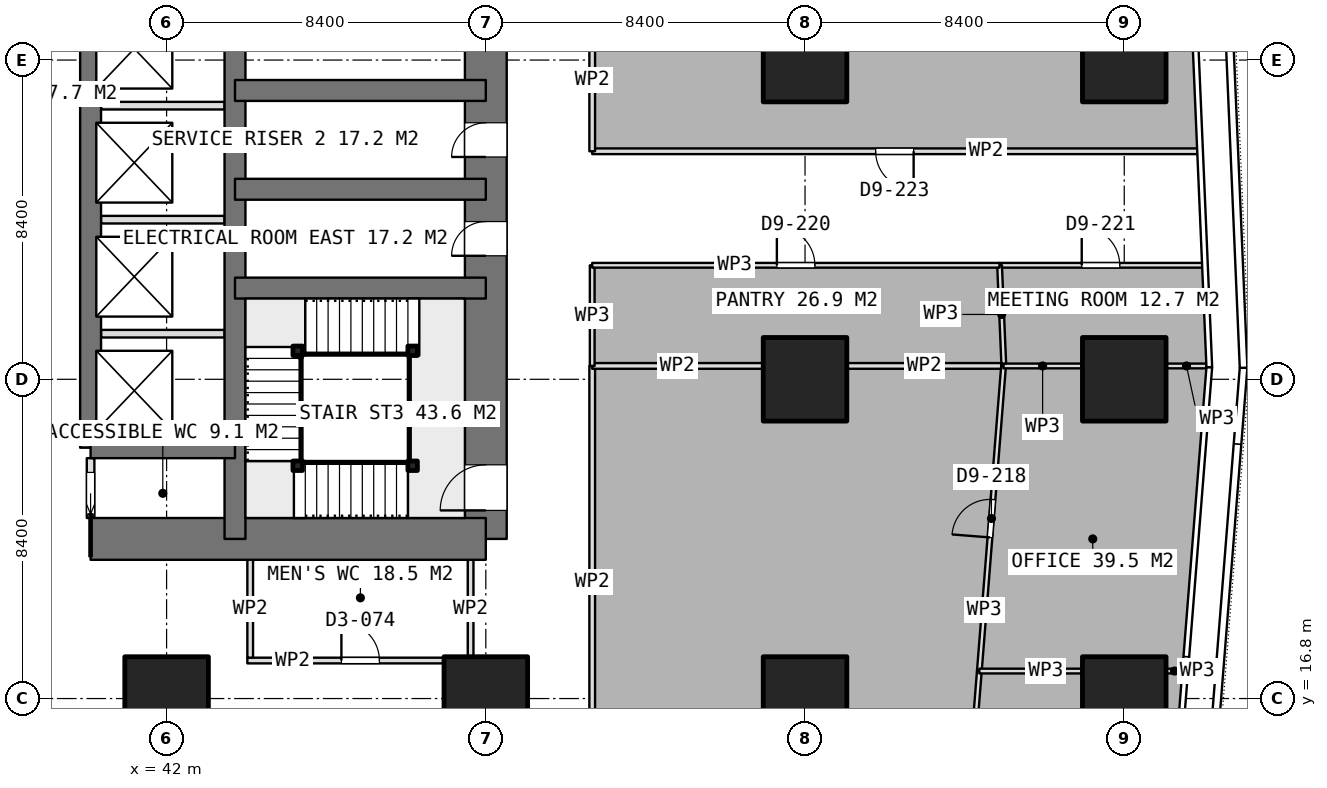
"""IFC4 building model, lengths in metres.
Left out: names, types, materials, properties, quantities, classifications, styles, units other than length and angle.
Written with IfcOpenShell. Run it as: python <this file> out.ifc"""

import sys

from ifc_helpers import new_model, si_unit, direction, frame, frame_2d, origin, origin_2d, place, context, subcontext, project, spatial, rectangle, extrude, element, fill, save


model = new_model("IFC4")
c1 = context("Model", 3, precision=1e-05, world=origin(), true_north=direction((0.0, 1.0)))
c2 = subcontext(c1, "Body", "Model", "MODEL_VIEW")
j1 = project(units=[si_unit("LENGTHUNIT", "METRE"), si_unit("PLANEANGLEUNIT", "RADIAN")], contexts=[c1])
p1 = place(None, origin())
s1 = spatial("IfcSite", under=j1, at=p1, CompositionType="ELEMENT")
p2 = place(p1, origin())
s2 = spatial("IfcBuilding", under=s1, at=p2, CompositionType="ELEMENT")
p3 = place(p2, frame((0.0, 0.0, 66.65)))
s3 = spatial("IfcBuildingStorey", under=s2, at=p3, CompositionType="ELEMENT", Elevation=66.65)
p4 = place(p3, frame((40.0, 21.0, 0.0), z_axis=(0.0, 0.0, 1.0), x_axis=(1.0, 0.0, 0.0)))
e1 = element("IfcWall", 1, at=p4, inside=s3, PredefinedType="SHEAR", context=c2, shape_type="SweptSolid", body=[
    extrude(rectangle(XDim=10.4, YDim=1.1, at=frame_2d((5.2, 0.0))), origin(), (0.0, 0.0, 1.0), 3.75),
])
p5 = place(p3, frame((50.4, 21.0, 0.0), z_axis=(0.0, 0.0, 1.0), x_axis=(0.0, 1.0, 0.0)))
e2 = element("IfcWall", 2, at=p5, inside=s3, PredefinedType="SHEAR", context=c2, shape_type="SweptSolid", body=[
    extrude(rectangle(XDim=25.2, YDim=1.1, at=frame_2d((12.6, 0.0))), origin(), (0.0, 0.0, 1.0), 3.75),
])
p6 = place(p5, frame((16.2, 0.0, 0.0)))
e3 = element("IfcOpeningElement", 3, at=p6, cuts=e2, PredefinedType="OPENING", context=c2, shape_type="SweptSolid", body=[
    extrude(rectangle(XDim=1.2, YDim=2.1, at=frame_2d((0.6, 1.05))), frame((0.0, 0.56, 0.0), z_axis=(0.0, -1.0, 0.0), x_axis=(1.0, 0.0, 0.0)), (0.0, 0.0, 1.0), 1.12),
])
p7 = place(p5, frame((10.05, 0.0, 0.0)))
e4 = element("IfcOpeningElement", 4, at=p7, cuts=e2, PredefinedType="OPENING", context=c2, shape_type="SweptSolid", body=[
    extrude(rectangle(XDim=0.9, YDim=2.1, at=frame_2d((0.45, 1.05))), frame((0.0, 0.56, 0.0), z_axis=(0.0, -1.0, 0.0), x_axis=(1.0, 0.0, 0.0)), (0.0, 0.0, 1.0), 1.12),
])
p8 = place(p5, frame((7.45, 0.0, 0.0)))
e5 = element("IfcOpeningElement", 5, at=p8, cuts=e2, PredefinedType="OPENING", context=c2, shape_type="SweptSolid", body=[
    extrude(rectangle(XDim=0.9, YDim=2.1, at=frame_2d((0.45, 1.05))), frame((0.0, 0.56, 0.0), z_axis=(0.0, -1.0, 0.0), x_axis=(1.0, 0.0, 0.0)), (0.0, 0.0, 1.0), 1.12),
])
p9 = place(p5, frame((0.75, 0.0, 0.0)))
e6 = element("IfcOpeningElement", 6, at=p9, cuts=e2, PredefinedType="OPENING", context=c2, shape_type="SweptSolid", body=[
    extrude(rectangle(XDim=1.2, YDim=2.1, at=frame_2d((0.6, 1.05))), frame((0.0, 0.56, 0.0), z_axis=(0.0, -1.0, 0.0), x_axis=(1.0, 0.0, 0.0)), (0.0, 0.0, 1.0), 1.12),
])
p10 = place(p3, frame((43.8, 21.0, 0.0), z_axis=(0.0, 0.0, 1.0), x_axis=(0.0, 1.0, 0.0)))
e7 = element("IfcWall", 7, at=p10, inside=s3, PredefinedType="SHEAR", context=c2, shape_type="SweptSolid", body=[
    extrude(rectangle(XDim=25.2, YDim=0.55, at=frame_2d((12.6, 0.0))), origin(), (0.0, 0.0, 1.0), 3.75),
])
p11 = place(p3, frame((40.0, 23.4, 0.0), z_axis=(0.0, 0.0, 1.0), x_axis=(0.0, 1.0, 0.0)))
e8 = element("IfcWall", 8, at=p11, inside=s3, PredefinedType="SHEAR", context=c2, shape_type="SweptSolid", body=[
    extrude(rectangle(XDim=18.0, YDim=0.55, at=frame_2d((9.0, 0.0))), origin(), (0.0, 0.0, 1.0), 3.75),
])
p12 = place(p3, frame((40.0, 23.4, 0.0), z_axis=(0.0, 0.0, 1.0), x_axis=(1.0, 0.0, 0.0)))
e9 = element("IfcWall", 9, at=p12, inside=s3, PredefinedType="SHEAR", context=c2, shape_type="SweptSolid", body=[
    extrude(rectangle(XDim=3.8, YDim=0.55, at=frame_2d((1.9, 0.0))), origin(), (0.0, 0.0, 1.0), 3.75),
])
for number, where, z_axis, x_axis in (
    (10, (43.8, 27.6, 0.0), (0.0, 0.0, 1.0), (1.0, 0.0, 0.0)),
    (11, (43.8, 30.2, 0.0), (0.0, 0.0, 1.0), (1.0, 0.0, 0.0)),
    (12, (43.8, 32.8, 0.0), (0.0, 0.0, 1.0), (1.0, 0.0, 0.0)),
):
    element("IfcWall", number, at=place(p3, frame(where, z_axis=z_axis, x_axis=x_axis)), inside=s3, PredefinedType="SHEAR", context=c2, shape_type="SweptSolid", body=[
        extrude(rectangle(XDim=6.6, YDim=0.55, at=frame_2d((3.3, 0.0))), origin(), (0.0, 0.0, 1.0), 3.75),
    ])
for number, where, z_axis, x_axis in (
    (13, (42.0, 16.8, 0.0), (0.0, 0.0, 1.0), (1.0, 0.0, 0.0)),
    (14, (50.4, 16.8, 0.0), (0.0, 0.0, 1.0), (1.0, 0.0, 0.0)),
    (15, (58.8, 16.8, 0.0), (0.0, 0.0, 1.0), (1.0, 0.0, 0.0)),
    (16, (58.8, 25.2, 0.0), (0.0, 0.0, 1.0), (1.0, 0.0, 0.0)),
    (17, (58.8, 33.6, 0.0), (0.0, 0.0, 1.0), (1.0, 0.0, 0.0)),
    (18, (67.2, 16.8, 0.0), (0.0, 0.0, 1.0), (1.0, 0.0, 0.0)),
    (19, (67.2, 25.2, 0.0), (0.0, 0.0, 1.0), (1.0, 0.0, 0.0)),
    (20, (67.2, 33.6, 0.0), (0.0, 0.0, 1.0), (1.0, 0.0, 0.0)),
):
    element("IfcColumn", number, at=place(p3, frame(where, z_axis=z_axis, x_axis=x_axis)), inside=s3, PredefinedType="COLUMN", context=c2, shape_type="SweptSolid", body=[
        extrude(rectangle(XDim=2.2, YDim=2.2, at=origin_2d()), origin(), (0.0, 0.0, 1.0), 3.75),
    ])
for number, where, z_axis, x_axis in (
    (21, (40.275, 26.4, 0.0), (0.0, 0.0, 1.0), (1.0, 0.0, 0.0)),
    (22, (40.275, 29.4, 0.0), (0.0, 0.0, 1.0), (1.0, 0.0, 0.0)),
    (23, (40.275, 32.4, 0.0), (0.0, 0.0, 1.0), (1.0, 0.0, 0.0)),
):
    element("IfcWall", number, at=place(p3, frame(where, z_axis=z_axis, x_axis=x_axis)), inside=s3, PredefinedType="PARTITIONING", context=c2, shape_type="SweptSolid", body=[
        extrude(rectangle(XDim=3.25, YDim=0.2, at=frame_2d((1.625, 0.0))), origin(), (0.0, 0.0, 1.0), 3.5),
    ])
p13 = place(p3, frame((40.0, 21.55, 0.0), z_axis=(0.0, 0.0, 1.0), x_axis=(0.0, 1.0, 0.0)))
e24 = element("IfcWall", 24, at=p13, inside=s3, PredefinedType="PARTITIONING", context=c2, shape_type="SweptSolid", body=[
    extrude(rectangle(XDim=1.575, YDim=0.2, at=frame_2d((0.788, 0.0))), origin(), (0.0, 0.0, 1.0), 3.5),
])
p14 = place(p13, frame((0.1, 0.0, 0.0)))
e25 = element("IfcOpeningElement", 25, at=p14, cuts=e24, PredefinedType="OPENING", context=c2, shape_type="SweptSolid", body=[
    extrude(rectangle(XDim=1.1, YDim=2.1, at=frame_2d((0.55, 1.05))), frame((0.0, 0.11, 0.0), z_axis=(0.0, -1.0, 0.0), x_axis=(1.0, 0.0, 0.0)), (0.0, 0.0, 1.0), 0.22),
])
p15 = place(p3, frame((44.125, 17.8, 0.0), z_axis=(0.0, 0.0, 1.0), x_axis=(1.0, 0.0, 0.0)))
e26 = element("IfcWall", 26, at=p15, inside=s3, PredefinedType="PARTITIONING", context=c2, shape_type="SweptSolid", body=[
    extrude(rectangle(XDim=5.95, YDim=0.15, at=frame_2d((2.975, 0.0))), origin(), (0.0, 0.0, 1.0), 3.5),
])
p16 = place(p15, frame((2.475, 0.0, 0.0)))
e27 = element("IfcOpeningElement", 27, at=p16, cuts=e26, PredefinedType="OPENING", context=c2, shape_type="SweptSolid", body=[
    extrude(rectangle(XDim=1.0, YDim=2.1, at=frame_2d((0.5, 1.05))), frame((0.0, 0.085, 0.0), z_axis=(0.0, -1.0, 0.0), x_axis=(1.0, 0.0, 0.0)), (0.0, 0.0, 1.0), 0.17),
])
for number, where, z_axis, x_axis in (
    (28, (44.2, 17.875, 0.0), (0.0, 0.0, 1.0), (0.0, 1.0, 0.0)),
    (29, (50.0, 17.875, 0.0), (0.0, 0.0, 1.0), (0.0, 1.0, 0.0)),
):
    element("IfcWall", number, at=place(p3, frame(where, z_axis=z_axis, x_axis=x_axis)), inside=s3, PredefinedType="PARTITIONING", context=c2, shape_type="SweptSolid", body=[
        extrude(rectangle(XDim=2.575, YDim=0.15, at=frame_2d((1.288, 0.0))), origin(), (0.0, 0.0, 1.0), 3.5),
    ])
p17 = place(p3, frame((62.996, 12.599, 0.0), z_axis=(0.0, 0.0, 1.0), x_axis=(0.079134233178, 0.996863969225, 0.0)))
e30 = element("IfcWall", 30, at=p17, inside=s3, PredefinedType="PARTITIONING", context=c2, shape_type="SweptSolid", body=[
    extrude(rectangle(XDim=4.939, YDim=0.125, at=frame_2d((2.47, 0.0))), origin(), (0.0, 0.0, 1.0), 3.5),
])
p18 = place(p3, frame((63.387, 17.523, 0.0), z_axis=(0.0, 0.0, 1.0), x_axis=(1.0, 0.0, 0.0)))
e31 = element("IfcWall", 31, at=p18, inside=s3, PredefinedType="PARTITIONING", context=c2, shape_type="SweptSolid", body=[
    extrude(rectangle(XDim=2.693, YDim=0.125, at=frame_2d((1.347, 0.0))), origin(), (0.0, 0.0, 1.0), 3.5),
])
p19 = place(p3, frame((68.32, 17.523, 0.0), z_axis=(0.0, 0.0, 1.0), x_axis=(1.0, 0.0, 0.0)))
e32 = element("IfcWall", 32, at=p19, inside=s3, PredefinedType="PARTITIONING", context=c2, shape_type="SweptSolid", body=[
    extrude(rectangle(XDim=0.403, YDim=0.125, at=frame_2d((0.201, 0.0))), origin(), (0.0, 0.0, 1.0), 3.5),
])
p20 = place(p3, frame((63.387, 17.524, 0.0), z_axis=(0.0, 0.0, 1.0), x_axis=(0.079102910118, 0.996866455254, 0.0)))
e33 = element("IfcWall", 33, at=p20, inside=s3, PredefinedType="PARTITIONING", context=c2, shape_type="SweptSolid", body=[
    extrude(rectangle(XDim=8.052, YDim=0.125, at=frame_2d((4.026, 0.0))), origin(), (0.0, 0.0, 1.0), 3.5),
])
p21 = place(p20, frame((3.526, 0.0, 0.0)))
e34 = element("IfcOpeningElement", 34, at=p21, cuts=e33, PredefinedType="OPENING", context=c2, shape_type="SweptSolid", body=[
    extrude(rectangle(XDim=1.0, YDim=2.1, at=frame_2d((0.5, 1.05))), frame((0.0, 0.073, 0.0), z_axis=(0.0, -1.0, 0.0), x_axis=(1.0, 0.0, 0.0)), (0.0, 0.0, 1.0), 0.145),
])
p22 = place(p3, frame((64.024, 25.551, 0.0), z_axis=(0.0, 0.0, 1.0), x_axis=(1.0, 0.0, 0.0)))
e35 = element("IfcWall", 35, at=p22, inside=s3, PredefinedType="PARTITIONING", context=c2, shape_type="SweptSolid", body=[
    extrude(rectangle(XDim=2.056, YDim=0.125, at=frame_2d((1.028, 0.0))), origin(), (0.0, 0.0, 1.0), 3.5),
])
p23 = place(p3, frame((68.32, 25.551, 0.0), z_axis=(0.0, 0.0, 1.0), x_axis=(1.0, 0.0, 0.0)))
e36 = element("IfcWall", 36, at=p23, inside=s3, PredefinedType="PARTITIONING", context=c2, shape_type="SweptSolid", body=[
    extrude(rectangle(XDim=1.037, YDim=0.125, at=frame_2d((0.519, 0.0))), origin(), (0.0, 0.0, 1.0), 3.5),
])
p24 = place(p3, frame((53.2, 14.2, 0.0), z_axis=(0.0, 0.0, 1.0), x_axis=(0.0, 1.0, 0.0)))
e37 = element("IfcWall", 37, at=p24, inside=s3, PredefinedType="PARTITIONING", context=c2, shape_type="SweptSolid", body=[
    extrude(rectangle(XDim=11.352, YDim=0.15, at=frame_2d((5.676, 0.0))), origin(), (0.0, 0.0, 1.0), 3.5),
])
p25 = place(p3, frame((53.2, 25.552, 0.0), z_axis=(0.0, 0.0, 1.0), x_axis=(1.0, 0.0, 0.0)))
e38 = element("IfcWall", 38, at=p25, inside=s3, PredefinedType="PARTITIONING", context=c2, shape_type="SweptSolid", body=[
    extrude(rectangle(XDim=4.48, YDim=0.15, at=frame_2d((2.24, 0.0))), origin(), (0.0, 0.0, 1.0), 3.5),
])
p26 = place(p3, frame((59.92, 25.552, 0.0), z_axis=(0.0, 0.0, 1.0), x_axis=(1.0, 0.0, 0.0)))
e39 = element("IfcWall", 39, at=p26, inside=s3, PredefinedType="PARTITIONING", context=c2, shape_type="SweptSolid", body=[
    extrude(rectangle(XDim=4.041, YDim=0.15, at=frame_2d((2.021, 0.0))), origin(), (0.0, 0.0, 1.0), 3.5),
])
p27 = place(p3, frame((69.145, 31.2, 0.0), z_axis=(0.0, 0.0, 1.0), x_axis=(-1.0, 0.0, 0.0)))
e40 = element("IfcWall", 40, at=p27, inside=s3, PredefinedType="PARTITIONING", context=c2, shape_type="SweptSolid", body=[
    extrude(rectangle(XDim=15.945, YDim=0.15, at=frame_2d((7.973, 0.0))), origin(), (0.0, 0.0, 1.0), 3.5),
])
p28 = place(p27, frame((7.487, 0.0, 0.0)))
e41 = element("IfcOpeningElement", 41, at=p28, cuts=e40, PredefinedType="OPENING", context=c2, shape_type="SweptSolid", body=[
    extrude(rectangle(XDim=1.0, YDim=2.1, at=frame_2d((0.5, 1.05))), frame((0.0, 0.085, 0.0), z_axis=(0.0, -1.0, 0.0), x_axis=(1.0, 0.0, 0.0)), (0.0, 0.0, 1.0), 0.17),
])
p29 = place(p3, frame((53.2, 31.2, 0.0), z_axis=(0.0, 0.0, 1.0), x_axis=(0.0, 1.0, 0.0)))
e42 = element("IfcWall", 42, at=p29, inside=s3, PredefinedType="PARTITIONING", context=c2, shape_type="SweptSolid", body=[
    extrude(rectangle(XDim=3.732, YDim=0.15, at=frame_2d((1.866, 0.0))), origin(), (0.0, 0.0, 1.0), 3.5),
])
p30 = place(p3, frame((63.919, 28.2, 0.0), z_axis=(0.0, 0.0, 1.0), x_axis=(1.0, 0.0, 0.0)))
e43 = element("IfcWall", 43, at=p30, inside=s3, PredefinedType="PARTITIONING", context=c2, shape_type="SweptSolid", body=[
    extrude(rectangle(XDim=5.355, YDim=0.125, at=frame_2d((2.677, 0.0))), origin(), (0.0, 0.0, 1.0), 3.5),
])
p31 = place(p30, frame((2.162, 0.0, 0.0)))
e44 = element("IfcOpeningElement", 44, at=p31, cuts=e43, PredefinedType="OPENING", context=c2, shape_type="SweptSolid", body=[
    extrude(rectangle(XDim=1.0, YDim=2.1, at=frame_2d((0.5, 1.05))), frame((0.0, 0.073, 0.0), z_axis=(0.0, -1.0, 0.0), x_axis=(1.0, 0.0, 0.0)), (0.0, 0.0, 1.0), 0.145),
])
p32 = place(p3, frame((64.029, 25.613, 0.0), z_axis=(0.0, 0.0, 1.0), x_axis=(-0.042524729329, 0.99909541456, 0.0)))
e45 = element("IfcWall", 45, at=p32, inside=s3, PredefinedType="PARTITIONING", context=c2, shape_type="SweptSolid", body=[
    extrude(rectangle(XDim=2.589, YDim=0.125, at=frame_2d((1.295, 0.0))), origin(), (0.0, 0.0, 1.0), 3.5),
])
p33 = place(p3, frame((53.2, 25.552, 0.0), z_axis=(0.0, 0.0, 1.0), x_axis=(0.0, 1.0, 0.0)))
e46 = element("IfcWall", 46, at=p33, inside=s3, PredefinedType="PARTITIONING", context=c2, shape_type="SweptSolid", body=[
    extrude(rectangle(XDim=2.648, YDim=0.125, at=frame_2d((1.324, 0.0))), origin(), (0.0, 0.0, 1.0), 3.5),
])
p34 = place(p3, frame((53.2, 28.2, 0.0), z_axis=(0.0, 0.0, 1.0), x_axis=(1.0, 0.0, 0.0)))
e47 = element("IfcWall", 47, at=p34, inside=s3, PredefinedType="PARTITIONING", context=c2, shape_type="SweptSolid", body=[
    extrude(rectangle(XDim=10.719, YDim=0.125, at=frame_2d((5.359, 0.0))), origin(), (0.0, 0.0, 1.0), 3.5),
])
p35 = place(p34, frame((4.859, 0.0, 0.0)))
e48 = element("IfcOpeningElement", 48, at=p35, cuts=e47, PredefinedType="OPENING", context=c2, shape_type="SweptSolid", body=[
    extrude(rectangle(XDim=1.0, YDim=2.1, at=frame_2d((0.5, 1.05))), frame((0.0, 0.073, 0.0), z_axis=(0.0, -1.0, 0.0), x_axis=(1.0, 0.0, 0.0)), (0.0, 0.0, 1.0), 0.145),
])
for number, where, z_axis, x_axis in (
    (49, (48.475, 22.925, 0.0), (0.0, 0.0, 1.0), (1.0, 0.0, 0.0)),
    (50, (45.45, 22.925, 0.0), (0.0, 0.0, 1.0), (1.0, 0.0, 0.0)),
    (51, (45.45, 25.95, 0.0), (0.0, 0.0, 1.0), (1.0, 0.0, 0.0)),
    (52, (48.475, 25.95, 0.0), (0.0, 0.0, 1.0), (1.0, 0.0, 0.0)),
):
    element("IfcColumn", number, at=place(p3, frame(where, z_axis=z_axis, x_axis=x_axis)), inside=s3, PredefinedType="COLUMN", context=c2, shape_type="SweptSolid", body=[
        extrude(rectangle(XDim=0.25, YDim=0.25, at=origin_2d()), origin(), (0.0, 0.0, 1.0), 3.75),
    ])
p36 = place(p7, origin())
e53 = element("IfcDoor", 53, at=p36, inside=s3, OperationType="SINGLE_SWING_LEFT", PredefinedType="DOOR", context=c2, shape_type="SweptSolid", body=[
    extrude(rectangle(XDim=0.9, YDim=2.1, at=frame_2d((0.45, 1.05))), frame((0.0, 0.025, 0.0), z_axis=(0.0, -1.0, 0.0), x_axis=(1.0, 0.0, 0.0)), (0.0, 0.0, 1.0), 0.05),
])
fill(e4, e53)
p37 = place(p8, origin())
e54 = element("IfcDoor", 54, at=p37, inside=s3, OperationType="SINGLE_SWING_LEFT", PredefinedType="DOOR", context=c2, shape_type="SweptSolid", body=[
    extrude(rectangle(XDim=0.9, YDim=2.1, at=frame_2d((0.45, 1.05))), frame((0.0, 0.025, 0.0), z_axis=(0.0, -1.0, 0.0), x_axis=(1.0, 0.0, 0.0)), (0.0, 0.0, 1.0), 0.05),
])
fill(e5, e54)
p38 = place(p14, origin())
e55 = element("IfcDoor", 55, at=p38, inside=s3, OperationType="SLIDING_TO_LEFT", PredefinedType="DOOR", context=c2, shape_type="SweptSolid", body=[
    extrude(rectangle(XDim=1.1, YDim=2.1, at=frame_2d((0.55, 1.05))), frame((0.0, 0.025, 0.0), z_axis=(0.0, -1.0, 0.0), x_axis=(1.0, 0.0, 0.0)), (0.0, 0.0, 1.0), 0.05),
])
fill(e25, e55)
p39 = place(p16, origin())
e56 = element("IfcDoor", 56, at=p39, inside=s3, OperationType="SINGLE_SWING_LEFT", PredefinedType="DOOR", context=c2, shape_type="SweptSolid", body=[
    extrude(rectangle(XDim=1.0, YDim=2.1, at=frame_2d((0.5, 1.05))), frame((0.0, 0.025, 0.0), z_axis=(0.0, -1.0, 0.0), x_axis=(1.0, 0.0, 0.0)), (0.0, 0.0, 1.0), 0.05),
])
fill(e27, e56)
p40 = place(p21, origin())
e57 = element("IfcDoor", 57, at=p40, inside=s3, OperationType="SINGLE_SWING_LEFT", PredefinedType="DOOR", context=c2, shape_type="SweptSolid", body=[
    extrude(rectangle(XDim=1.0, YDim=2.1, at=frame_2d((0.5, 1.05))), frame((0.0, 0.025, 0.0), z_axis=(0.0, -1.0, 0.0), x_axis=(1.0, 0.0, 0.0)), (0.0, 0.0, 1.0), 0.05),
])
fill(e34, e57)
p41 = place(p28, origin())
e58 = element("IfcDoor", 58, at=p41, inside=s3, OperationType="SINGLE_SWING_LEFT", PredefinedType="DOOR", context=c2, shape_type="SweptSolid", body=[
    extrude(rectangle(XDim=1.0, YDim=2.1, at=frame_2d((0.5, 1.05))), frame((0.0, 0.025, 0.0), z_axis=(0.0, -1.0, 0.0), x_axis=(1.0, 0.0, 0.0)), (0.0, 0.0, 1.0), 0.05),
])
fill(e41, e58)
p42 = place(p31, origin())
e59 = element("IfcDoor", 59, at=p42, inside=s3, OperationType="SINGLE_SWING_LEFT", PredefinedType="DOOR", context=c2, shape_type="SweptSolid", body=[
    extrude(rectangle(XDim=1.0, YDim=2.1, at=frame_2d((0.5, 1.05))), frame((0.0, 0.025, 0.0), z_axis=(0.0, -1.0, 0.0), x_axis=(1.0, 0.0, 0.0)), (0.0, 0.0, 1.0), 0.05),
])
fill(e44, e59)
p43 = place(p35, origin())
e60 = element("IfcDoor", 60, at=p43, inside=s3, OperationType="SINGLE_SWING_LEFT", PredefinedType="DOOR", context=c2, shape_type="SweptSolid", body=[
    extrude(rectangle(XDim=1.0, YDim=2.1, at=frame_2d((0.5, 1.05))), frame((0.0, 0.025, 0.0), z_axis=(0.0, -1.0, 0.0), x_axis=(1.0, 0.0, 0.0)), (0.0, 0.0, 1.0), 0.05),
])
fill(e48, e60)
p44 = place(p9, origin())
e61 = element("IfcDoor", 61, at=p44, inside=s3, OperationType="SINGLE_SWING_RIGHT", PredefinedType="DOOR", context=c2, shape_type="SweptSolid", body=[
    extrude(rectangle(XDim=1.2, YDim=2.1, at=frame_2d((0.6, 1.05))), frame((0.0, 0.025, 0.0), z_axis=(0.0, -1.0, 0.0), x_axis=(1.0, 0.0, 0.0)), (0.0, 0.0, 1.0), 0.05),
])
fill(e6, e61)
save(model, sys.argv[1])
